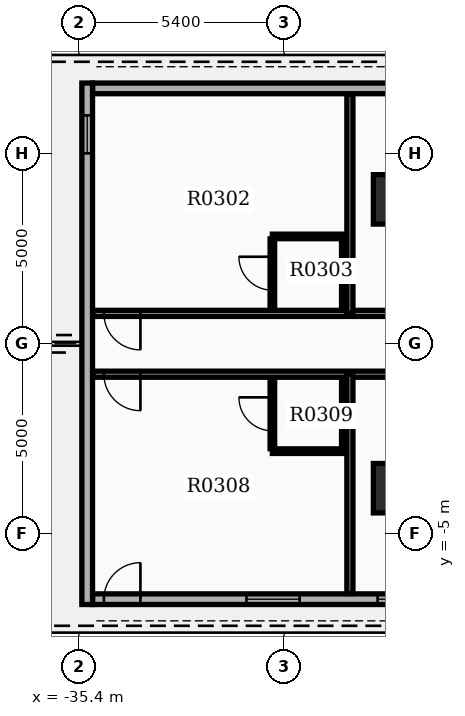
"""IFC4 building model, lengths in metres.
Left out: names, types, materials, properties, quantities, classifications, styles, units other than length and angle.
Written with IfcOpenShell. Run it as: python <this file> out.ifc"""

import sys

from ifc_helpers import new_model, si_unit, direction, frame, frame_2d, origin, origin_2d, place, context, subcontext, project, spatial, rectangle, extrude, element, fill, save


model = new_model("IFC4")
c1 = context("Model", 3, precision=1e-05, world=origin(), true_north=direction((0.0, 1.0)))
c2 = subcontext(c1, "Body", "Model", "MODEL_VIEW")
j1 = project(units=[si_unit("LENGTHUNIT", "METRE"), si_unit("PLANEANGLEUNIT", "RADIAN")], contexts=[c1])
p1 = place(None, origin())
s1 = spatial("IfcSite", under=j1, at=p1, CompositionType="ELEMENT")
p2 = place(p1, origin())
s2 = spatial("IfcBuilding", under=s1, at=p2, CompositionType="ELEMENT")
p3 = place(p2, frame((0.0, 0.0, 23.7)))
s3 = spatial("IfcBuildingStorey", under=s2, at=p3, CompositionType="ELEMENT", Elevation=23.7)
for number, where, z_axis, x_axis in (
    (1, (-27.0, -3.8, 0.0), (0.0, 0.0, 1.0), (1.0, 0.0, 0.0)),
    (2, (-27.0, 3.8, 0.0), (0.0, 0.0, 1.0), (1.0, 0.0, 0.0)),
):
    element("IfcColumn", number, at=place(p3, frame(where, z_axis=z_axis, x_axis=x_axis)), inside=s3, PredefinedType="COLUMN", context=c2, shape_type="SweptSolid", body=[
        extrude(rectangle(XDim=1.3, YDim=1.3, at=origin_2d()), origin(), (0.0, 0.0, 1.0), 3.9),
    ])
p4 = place(p3, frame((-14.94, 6.72, 0.0), z_axis=(0.0, 0.0, 1.0), x_axis=(-1.0, 0.0, 0.0)))
e3 = element("IfcWall", 3, at=p4, inside=s3, PredefinedType="STANDARD", context=c2, shape_type="SweptSolid", body=[
    extrude(rectangle(XDim=20.1, YDim=0.28, at=frame_2d((10.05, 0.0))), origin(), (0.0, 0.0, 1.0), 2.91),
])
p5 = place(p4, frame((0.85, 0.0, 0.8)))
e4 = element("IfcOpeningElement", 4, at=p5, cuts=e3, PredefinedType="OPENING", context=c2, shape_type="SweptSolid", body=[
    extrude(rectangle(XDim=1.4, YDim=1.6, at=frame_2d((0.7, 0.8))), frame((0.0, 0.15, 0.0), z_axis=(0.0, -1.0, 0.0), x_axis=(1.0, 0.0, 0.0)), (0.0, 0.0, 1.0), 0.3),
])
p6 = place(p4, frame((4.05, 0.0, 0.8)))
e5 = element("IfcOpeningElement", 5, at=p6, cuts=e3, PredefinedType="OPENING", context=c2, shape_type="SweptSolid", body=[
    extrude(rectangle(XDim=1.4, YDim=1.6, at=frame_2d((0.7, 0.8))), frame((0.0, 0.15, 0.0), z_axis=(0.0, -1.0, 0.0), x_axis=(1.0, 0.0, 0.0)), (0.0, 0.0, 1.0), 0.3),
])
p7 = place(p4, frame((7.25, 0.0, 0.8)))
e6 = element("IfcOpeningElement", 6, at=p7, cuts=e3, PredefinedType="OPENING", context=c2, shape_type="SweptSolid", body=[
    extrude(rectangle(XDim=1.4, YDim=1.6, at=frame_2d((0.7, 0.8))), frame((0.0, 0.15, 0.0), z_axis=(0.0, -1.0, 0.0), x_axis=(1.0, 0.0, 0.0)), (0.0, 0.0, 1.0), 0.3),
])
p8 = place(p4, frame((10.45, 0.0, 0.8)))
e7 = element("IfcOpeningElement", 7, at=p8, cuts=e3, PredefinedType="OPENING", context=c2, shape_type="SweptSolid", body=[
    extrude(rectangle(XDim=1.4, YDim=1.6, at=frame_2d((0.7, 0.8))), frame((0.0, 0.15, 0.0), z_axis=(0.0, -1.0, 0.0), x_axis=(1.0, 0.0, 0.0)), (0.0, 0.0, 1.0), 0.3),
])
p9 = place(p3, frame((-35.04, -6.72, 0.0), z_axis=(0.0, 0.0, 1.0), x_axis=(1.0, 0.0, 0.0)))
e8 = element("IfcWall", 8, at=p9, inside=s3, PredefinedType="STANDARD", context=c2, shape_type="SweptSolid", body=[
    extrude(rectangle(XDim=20.1, YDim=0.28, at=frame_2d((10.05, 0.0))), origin(), (0.0, 0.0, 1.0), 2.91),
])
p10 = place(p9, frame((4.05, 0.0, 0.8)))
e9 = element("IfcOpeningElement", 9, at=p10, cuts=e8, PredefinedType="OPENING", context=c2, shape_type="SweptSolid", body=[
    extrude(rectangle(XDim=1.4, YDim=1.6, at=frame_2d((0.7, 0.8))), frame((0.0, 0.15, 0.0), z_axis=(0.0, -1.0, 0.0), x_axis=(1.0, 0.0, 0.0)), (0.0, 0.0, 1.0), 0.3),
])
p11 = place(p9, frame((7.5, 0.0, 0.8)))
e10 = element("IfcOpeningElement", 10, at=p11, cuts=e8, PredefinedType="OPENING", context=c2, shape_type="SweptSolid", body=[
    extrude(rectangle(XDim=1.4, YDim=1.6, at=frame_2d((0.7, 0.8))), frame((0.0, 0.15, 0.0), z_axis=(0.0, -1.0, 0.0), x_axis=(1.0, 0.0, 0.0)), (0.0, 0.0, 1.0), 0.3),
])
p12 = place(p9, frame((10.7, 0.0, 0.8)))
e11 = element("IfcOpeningElement", 11, at=p12, cuts=e8, PredefinedType="OPENING", context=c2, shape_type="SweptSolid", body=[
    extrude(rectangle(XDim=1.4, YDim=1.6, at=frame_2d((0.7, 0.8))), frame((0.0, 0.15, 0.0), z_axis=(0.0, -1.0, 0.0), x_axis=(1.0, 0.0, 0.0)), (0.0, 0.0, 1.0), 0.3),
])
p13 = place(p9, frame((0.3, 0.0, 0.0)))
e12 = element("IfcOpeningElement", 12, at=p13, cuts=e8, PredefinedType="OPENING", context=c2, shape_type="SweptSolid", body=[
    extrude(rectangle(XDim=0.96, YDim=2.1, at=frame_2d((0.48, 1.05))), frame((0.0, 0.15, 0.0), z_axis=(0.0, -1.0, 0.0), x_axis=(1.0, 0.0, 0.0)), (0.0, 0.0, 1.0), 0.3),
])
p14 = place(p9, frame((14.799, 0.0, 0.85)))
e13 = element("IfcOpeningElement", 13, at=p14, cuts=e8, PredefinedType="OPENING", context=c2, shape_type="SweptSolid", body=[
    extrude(rectangle(XDim=1.2, YDim=1.6, at=frame_2d((0.6, 0.8))), frame((0.0, 0.15, 0.0), z_axis=(0.0, -1.0, 0.0), x_axis=(1.0, 0.0, 0.0)), (0.0, 0.0, 1.0), 0.3),
])
p15 = place(p3, frame((-35.18, 6.86, 0.0), z_axis=(0.0, 0.0, 1.0), x_axis=(0.0, -1.0, 0.0)))
e14 = element("IfcWall", 14, at=p15, inside=s3, PredefinedType="STANDARD", context=c2, shape_type="SweptSolid", body=[
    extrude(rectangle(XDim=13.72, YDim=0.28, at=frame_2d((6.86, 0.0))), origin(), (0.0, 0.0, 1.0), 2.91),
])
p16 = place(p15, frame((0.85, 0.0, 0.85)))
e15 = element("IfcOpeningElement", 15, at=p16, cuts=e14, PredefinedType="OPENING", context=c2, shape_type="SweptSolid", body=[
    extrude(rectangle(XDim=1.0, YDim=1.5, at=frame_2d((0.5, 0.75))), frame((0.0, 0.15, 0.0), z_axis=(0.0, -1.0, 0.0), x_axis=(1.0, 0.0, 0.0)), (0.0, 0.0, 1.0), 0.3),
])
p17 = place(p3, frame((-14.85, 0.8, 0.0), z_axis=(0.0, 0.0, 1.0), x_axis=(-1.0, 0.0, 0.0)))
e16 = element("IfcWall", 16, at=p17, inside=s3, PredefinedType="PARTITIONING", context=c2, shape_type="SweptSolid", body=[
    extrude(rectangle(XDim=20.182, YDim=0.16, at=frame_2d((10.091, 0.0))), origin(), (0.0, 0.0, 1.0), 2.9),
])
p18 = place(p17, frame((2.61, 0.0, 0.0)))
e17 = element("IfcOpeningElement", 17, at=p18, cuts=e16, PredefinedType="OPENING", context=c2, shape_type="SweptSolid", body=[
    extrude(rectangle(XDim=0.96, YDim=2.15, at=frame_2d((0.48, 1.075))), frame((0.0, 0.09, 0.0), z_axis=(0.0, -1.0, 0.0), x_axis=(1.0, 0.0, 0.0)), (0.0, 0.0, 1.0), 0.18),
])
p19 = place(p17, frame((8.994, 0.0, 0.0)))
e18 = element("IfcOpeningElement", 18, at=p19, cuts=e16, PredefinedType="OPENING", context=c2, shape_type="SweptSolid", body=[
    extrude(rectangle(XDim=0.96, YDim=2.15, at=frame_2d((0.48, 1.075))), frame((0.0, 0.09, 0.0), z_axis=(0.0, -1.0, 0.0), x_axis=(1.0, 0.0, 0.0)), (0.0, 0.0, 1.0), 0.18),
])
p20 = place(p17, frame((18.93, 0.0, 0.0)))
e19 = element("IfcOpeningElement", 19, at=p20, cuts=e16, PredefinedType="OPENING", context=c2, shape_type="SweptSolid", body=[
    extrude(rectangle(XDim=0.96, YDim=2.15, at=frame_2d((0.48, 1.075))), frame((0.0, 0.09, 0.0), z_axis=(0.0, -1.0, 0.0), x_axis=(1.0, 0.0, 0.0)), (0.0, 0.0, 1.0), 0.18),
])
p21 = place(p3, frame((-28.268, 0.8, 0.0), z_axis=(0.0, 0.0, 1.0), x_axis=(0.0, 1.0, 0.0)))
e20 = element("IfcWall", 20, at=p21, inside=s3, PredefinedType="PARTITIONING", context=c2, shape_type="SweptSolid", body=[
    extrude(rectangle(XDim=5.772, YDim=0.16, at=frame_2d((2.886, 0.0))), origin(), (0.0, 0.0, 1.0), 2.9),
])
p22 = place(p3, frame((-30.308, 0.94, 0.0), z_axis=(0.0, 0.0, 1.0), x_axis=(0.0, 1.0, 0.0)))
e21 = element("IfcWall", 21, at=p22, inside=s3, PredefinedType="PARTITIONING", context=c2, shape_type="SweptSolid", body=[
    extrude(rectangle(XDim=1.82, YDim=0.12, at=frame_2d((0.91, 0.0))), origin(), (0.0, 0.0, 1.0), 2.9),
])
p23 = place(p22, frame((0.47, 0.0, 0.0)))
e22 = element("IfcOpeningElement", 22, at=p23, cuts=e21, PredefinedType="OPENING", context=c2, shape_type="SweptSolid", body=[
    extrude(rectangle(XDim=0.88, YDim=2.1, at=frame_2d((0.44, 1.05))), frame((0.0, 0.07, 0.0), z_axis=(0.0, -1.0, 0.0), x_axis=(1.0, 0.0, 0.0)), (0.0, 0.0, 1.0), 0.14),
])
p24 = place(p3, frame((-28.428, 0.94, 0.0), z_axis=(0.0, 0.0, 1.0), x_axis=(0.0, 1.0, 0.0)))
e23 = element("IfcWall", 23, at=p24, inside=s3, PredefinedType="PARTITIONING", context=c2, shape_type="SweptSolid", body=[
    extrude(rectangle(XDim=1.82, YDim=0.12, at=frame_2d((0.91, 0.0))), origin(), (0.0, 0.0, 1.0), 2.9),
])
p25 = place(p3, frame((-28.428, 2.825, 0.0), z_axis=(0.0, 0.0, 1.0), x_axis=(-1.0, 0.0, 0.0)))
e24 = element("IfcWall", 24, at=p25, inside=s3, PredefinedType="PARTITIONING", context=c2, shape_type="SweptSolid", body=[
    extrude(rectangle(XDim=1.88, YDim=0.12, at=frame_2d((0.94, 0.0))), origin(), (0.0, 0.0, 1.0), 2.9),
])
p26 = place(p3, frame((-14.85, -0.8, 0.0), z_axis=(0.0, 0.0, 1.0), x_axis=(-1.0, 0.0, 0.0)))
e25 = element("IfcWall", 25, at=p26, inside=s3, PredefinedType="PARTITIONING", context=c2, shape_type="SweptSolid", body=[
    extrude(rectangle(XDim=20.182, YDim=0.16, at=frame_2d((10.091, 0.0))), origin(), (0.0, 0.0, 1.0), 2.9),
])
p27 = place(p26, frame((2.61, 0.0, 0.0)))
e26 = element("IfcOpeningElement", 26, at=p27, cuts=e25, PredefinedType="OPENING", context=c2, shape_type="SweptSolid", body=[
    extrude(rectangle(XDim=0.96, YDim=2.15, at=frame_2d((0.48, 1.075))), frame((0.0, 0.09, 0.0), z_axis=(0.0, -1.0, 0.0), x_axis=(1.0, 0.0, 0.0)), (0.0, 0.0, 1.0), 0.18),
])
p28 = place(p26, frame((8.994, 0.0, 0.0)))
e27 = element("IfcOpeningElement", 27, at=p28, cuts=e25, PredefinedType="OPENING", context=c2, shape_type="SweptSolid", body=[
    extrude(rectangle(XDim=0.96, YDim=2.15, at=frame_2d((0.48, 1.075))), frame((0.0, 0.09, 0.0), z_axis=(0.0, -1.0, 0.0), x_axis=(1.0, 0.0, 0.0)), (0.0, 0.0, 1.0), 0.18),
])
p29 = place(p26, frame((18.93, 0.0, 0.0)))
e28 = element("IfcOpeningElement", 28, at=p29, cuts=e25, PredefinedType="OPENING", context=c2, shape_type="SweptSolid", body=[
    extrude(rectangle(XDim=0.96, YDim=2.15, at=frame_2d((0.48, 1.075))), frame((0.0, 0.09, 0.0), z_axis=(0.0, -1.0, 0.0), x_axis=(1.0, 0.0, 0.0)), (0.0, 0.0, 1.0), 0.18),
])
p30 = place(p3, frame((-28.268, -0.8, 0.0), z_axis=(0.0, 0.0, 1.0), x_axis=(0.0, -1.0, 0.0)))
e29 = element("IfcWall", 29, at=p30, inside=s3, PredefinedType="PARTITIONING", context=c2, shape_type="SweptSolid", body=[
    extrude(rectangle(XDim=5.772, YDim=0.16, at=frame_2d((2.886, 0.0))), origin(), (0.0, 0.0, 1.0), 2.9),
])
p31 = place(p3, frame((-30.308, -2.76, 0.0), z_axis=(0.0, 0.0, 1.0), x_axis=(0.0, 1.0, 0.0)))
e30 = element("IfcWall", 30, at=p31, inside=s3, PredefinedType="PARTITIONING", context=c2, shape_type="SweptSolid", body=[
    extrude(rectangle(XDim=1.82, YDim=0.12, at=frame_2d((0.91, 0.0))), origin(), (0.0, 0.0, 1.0), 2.9),
])
p32 = place(p31, frame((0.47, 0.0, 0.0)))
e31 = element("IfcOpeningElement", 31, at=p32, cuts=e30, PredefinedType="OPENING", context=c2, shape_type="SweptSolid", body=[
    extrude(rectangle(XDim=0.88, YDim=2.1, at=frame_2d((0.44, 1.05))), frame((0.0, 0.07, 0.0), z_axis=(0.0, -1.0, 0.0), x_axis=(1.0, 0.0, 0.0)), (0.0, 0.0, 1.0), 0.14),
])
p33 = place(p3, frame((-28.428, -2.76, 0.0), z_axis=(0.0, 0.0, 1.0), x_axis=(0.0, 1.0, 0.0)))
e32 = element("IfcWall", 32, at=p33, inside=s3, PredefinedType="PARTITIONING", context=c2, shape_type="SweptSolid", body=[
    extrude(rectangle(XDim=1.82, YDim=0.12, at=frame_2d((0.91, 0.0))), origin(), (0.0, 0.0, 1.0), 2.9),
])
p34 = place(p3, frame((-28.428, -2.825, 0.0), z_axis=(0.0, 0.0, 1.0), x_axis=(-1.0, 0.0, 0.0)))
e33 = element("IfcWall", 33, at=p34, inside=s3, PredefinedType="PARTITIONING", context=c2, shape_type="SweptSolid", body=[
    extrude(rectangle(XDim=1.88, YDim=0.12, at=frame_2d((0.94, 0.0))), origin(), (0.0, 0.0, 1.0), 2.9),
])
p35 = place(p10, origin())
e34 = element("IfcWindow", 34, at=p35, inside=s3, PartitioningType="SINGLE_PANEL", PredefinedType="WINDOW", context=c2, shape_type="SweptSolid", body=[
    extrude(rectangle(XDim=1.4, YDim=1.6, at=frame_2d((0.7, 0.8))), frame((0.0, 0.03, 0.0), z_axis=(0.0, -1.0, 0.0), x_axis=(1.0, 0.0, 0.0)), (0.0, 0.0, 1.0), 0.06),
])
fill(e9, e34)
p36 = place(p11, origin())
e35 = element("IfcWindow", 35, at=p36, inside=s3, PartitioningType="SINGLE_PANEL", PredefinedType="WINDOW", context=c2, shape_type="SweptSolid", body=[
    extrude(rectangle(XDim=1.4, YDim=1.6, at=frame_2d((0.7, 0.8))), frame((0.0, 0.03, 0.0), z_axis=(0.0, -1.0, 0.0), x_axis=(1.0, 0.0, 0.0)), (0.0, 0.0, 1.0), 0.06),
])
fill(e10, e35)
p37 = place(p16, origin())
e36 = element("IfcWindow", 36, at=p37, inside=s3, PartitioningType="SINGLE_PANEL", PredefinedType="WINDOW", context=c2, shape_type="SweptSolid", body=[
    extrude(rectangle(XDim=1.0, YDim=1.5, at=frame_2d((0.5, 0.75))), frame((0.0, 0.03, 0.0), z_axis=(0.0, -1.0, 0.0), x_axis=(1.0, 0.0, 0.0)), (0.0, 0.0, 1.0), 0.06),
])
fill(e15, e36)
p38 = place(p13, origin())
e37 = element("IfcDoor", 37, at=p38, inside=s3, OperationType="SINGLE_SWING_RIGHT", PredefinedType="DOOR", context=c2, shape_type="SweptSolid", body=[
    extrude(rectangle(XDim=0.96, YDim=2.1, at=frame_2d((0.48, 1.05))), frame((0.0, 0.025, 0.0), z_axis=(0.0, -1.0, 0.0), x_axis=(1.0, 0.0, 0.0)), (0.0, 0.0, 1.0), 0.05),
])
fill(e12, e37)
p39 = place(p20, origin())
e38 = element("IfcDoor", 38, at=p39, inside=s3, OperationType="SINGLE_SWING_LEFT", PredefinedType="DOOR", context=c2, shape_type="SweptSolid", body=[
    extrude(rectangle(XDim=0.96, YDim=2.15, at=frame_2d((0.48, 1.075))), frame((0.0, 0.025, 0.0), z_axis=(0.0, -1.0, 0.0), x_axis=(1.0, 0.0, 0.0)), (0.0, 0.0, 1.0), 0.05),
])
fill(e19, e38)
p40 = place(p23, origin())
e39 = element("IfcDoor", 39, at=p40, inside=s3, OperationType="SINGLE_SWING_RIGHT", PredefinedType="DOOR", context=c2, shape_type="SweptSolid", body=[
    extrude(rectangle(XDim=0.88, YDim=2.1, at=frame_2d((0.44, 1.05))), frame((0.0, 0.025, 0.0), z_axis=(0.0, -1.0, 0.0), x_axis=(1.0, 0.0, 0.0)), (0.0, 0.0, 1.0), 0.05),
])
fill(e22, e39)
p41 = place(p29, origin())
e40 = element("IfcDoor", 40, at=p41, inside=s3, OperationType="SINGLE_SWING_LEFT", PredefinedType="DOOR", context=c2, shape_type="SweptSolid", body=[
    extrude(rectangle(XDim=0.96, YDim=2.15, at=frame_2d((0.48, 1.075))), frame((0.0, 0.025, 0.0), z_axis=(0.0, -1.0, 0.0), x_axis=(1.0, 0.0, 0.0)), (0.0, 0.0, 1.0), 0.05),
])
fill(e28, e40)
p42 = place(p32, origin())
e41 = element("IfcDoor", 41, at=p42, inside=s3, OperationType="SINGLE_SWING_RIGHT", PredefinedType="DOOR", context=c2, shape_type="SweptSolid", body=[
    extrude(rectangle(XDim=0.88, YDim=2.1, at=frame_2d((0.44, 1.05))), frame((0.0, 0.025, 0.0), z_axis=(0.0, -1.0, 0.0), x_axis=(1.0, 0.0, 0.0)), (0.0, 0.0, 1.0), 0.05),
])
fill(e31, e41)
save(model, sys.argv[1])
